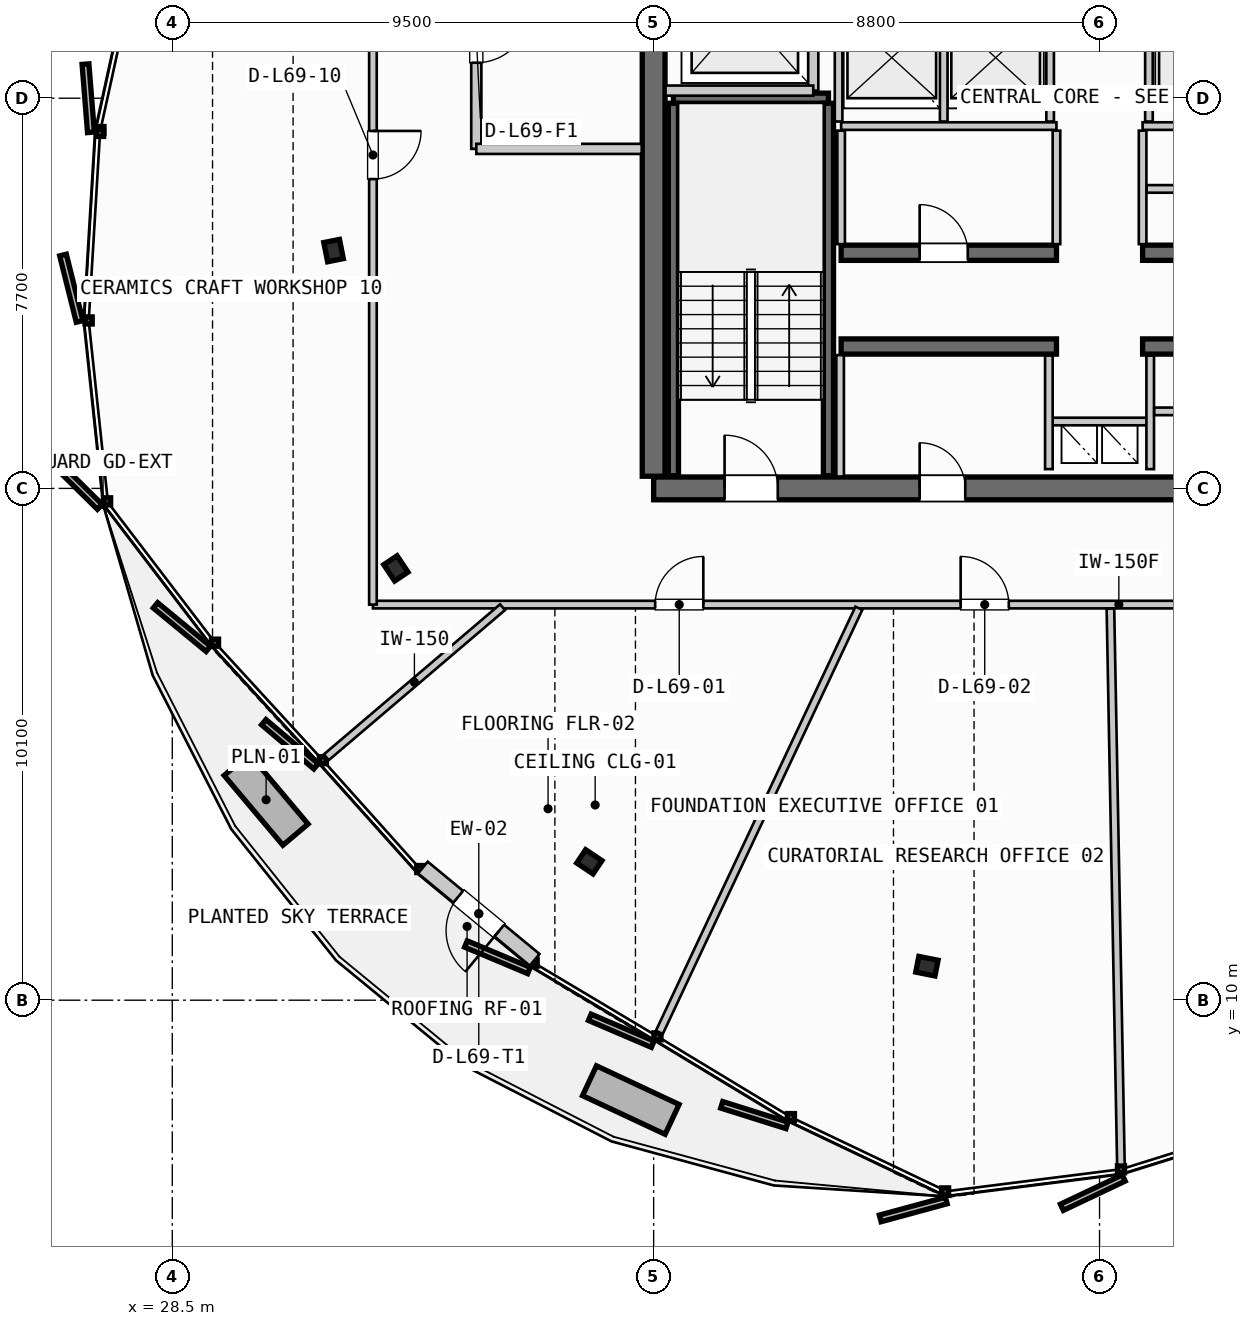
"""IFC4 building model, lengths in metres.
Left out: names, types, materials, properties, quantities, classifications, styles, units other than length and angle.
Written with IfcOpenShell. Run it as: python <this file> out.ifc"""

import sys

from ifc_helpers import new_model, si_unit, direction, frame, frame_2d, origin, origin_2d, place, context, subcontext, project, spatial, rectangle, i_section, extrude, source, transform, mapped, element, fill, save


model = new_model("IFC4")
c1 = context("Model", 3, precision=1e-05, world=origin(), true_north=direction((0.0, 1.0)))
c2 = subcontext(c1, "Body", "Model", "MODEL_VIEW")
j1 = project(units=[si_unit("LENGTHUNIT", "METRE"), si_unit("PLANEANGLEUNIT", "RADIAN")], contexts=[c1])
p1 = place(None, origin())
s1 = spatial("IfcSite", under=j1, at=p1, CompositionType="ELEMENT")
p2 = place(p1, origin())
s2 = spatial("IfcBuilding", under=s1, at=p2, CompositionType="ELEMENT")
p3 = place(p2, frame((0.0, 0.0, 262.9)))
s3 = spatial("IfcBuildingStorey", under=s2, at=p3, CompositionType="ELEMENT", Elevation=262.9)
p4 = place(p3, frame((38.0, 20.1, 0.0), z_axis=(0.0, 0.0, 1.0), x_axis=(1.0, 0.0, 0.0)))
e1 = element("IfcWall", 1, at=p4, inside=s3, PredefinedType="SHEAR", context=c2, shape_type="SweptSolid", body=[
    extrude(rectangle(XDim=17.6, YDim=0.45, at=frame_2d((8.8, 0.0))), origin(), (0.0, 0.0, 1.0), 3.21),
])
p5 = place(p4, frame((1.4, 0.0, 0.0)))
e2 = element("IfcOpeningElement", 2, at=p5, cuts=e1, PredefinedType="OPENING", context=c2, shape_type="SweptSolid", body=[
    extrude(rectangle(XDim=1.05, YDim=2.15, at=frame_2d((0.525, 1.075))), frame((0.0, 0.235, 0.0), z_axis=(0.0, -1.0, 0.0), x_axis=(1.0, 0.0, 0.0)), (0.0, 0.0, 1.0), 0.47),
])
p6 = place(p4, frame((15.15, 0.0, 0.0)))
e3 = element("IfcOpeningElement", 3, at=p6, cuts=e1, PredefinedType="OPENING", context=c2, shape_type="SweptSolid", body=[
    extrude(rectangle(XDim=1.05, YDim=2.15, at=frame_2d((0.525, 1.075))), frame((0.0, 0.235, 0.0), z_axis=(0.0, -1.0, 0.0), x_axis=(1.0, 0.0, 0.0)), (0.0, 0.0, 1.0), 0.47),
])
p7 = place(p4, frame((5.25, 0.0, 0.0)))
e4 = element("IfcOpeningElement", 4, at=p7, cuts=e1, PredefinedType="OPENING", context=c2, shape_type="SweptSolid", body=[
    extrude(rectangle(XDim=0.9, YDim=2.15, at=frame_2d((0.45, 1.075))), frame((0.0, 0.235, 0.0), z_axis=(0.0, -1.0, 0.0), x_axis=(1.0, 0.0, 0.0)), (0.0, 0.0, 1.0), 0.47),
])
p8 = place(p4, frame((11.4, 0.0, 0.0)))
e5 = element("IfcOpeningElement", 5, at=p8, cuts=e1, PredefinedType="OPENING", context=c2, shape_type="SweptSolid", body=[
    extrude(rectangle(XDim=0.95, YDim=2.15, at=frame_2d((0.475, 1.075))), frame((0.0, 0.235, 0.0), z_axis=(0.0, -1.0, 0.0), x_axis=(1.0, 0.0, 0.0)), (0.0, 0.0, 1.0), 0.47),
])
p9 = place(p3, frame((38.0, 35.26, 0.0), z_axis=(0.0, 0.0, 1.0), x_axis=(0.0, -1.0, 0.0)))
e6 = element("IfcWall", 6, at=p9, inside=s3, PredefinedType="SHEAR", context=c2, shape_type="SweptSolid", body=[
    extrude(rectangle(XDim=14.92, YDim=0.45, at=frame_2d((7.46, 0.0))), origin(), (0.0, 0.0, 1.0), 3.21),
])
p10 = place(p9, frame((5.21, 0.0, 0.0)))
e7 = element("IfcOpeningElement", 7, at=p10, cuts=e6, PredefinedType="OPENING", context=c2, shape_type="SweptSolid", body=[
    extrude(rectangle(XDim=1.1, YDim=2.2, at=frame_2d((0.55, 1.1))), frame((0.0, 0.235, 0.0), z_axis=(0.0, -1.0, 0.0), x_axis=(1.0, 0.0, 0.0)), (0.0, 0.0, 1.0), 0.47),
])
for number, where, z_axis, x_axis in (
    (8, (41.7, 22.9, 0.0), (0.0, 0.0, 1.0), (1.0, 0.0, 0.0)),
    (9, (47.65, 22.9, 0.0), (0.0, 0.0, 1.0), (1.0, 0.0, 0.0)),
):
    element("IfcWall", number, at=place(p3, frame(where, z_axis=z_axis, x_axis=x_axis)), inside=s3, PredefinedType="SHEAR", context=c2, shape_type="SweptSolid", body=[
        extrude(rectangle(XDim=4.25, YDim=0.3, at=frame_2d((2.125, 0.0))), origin(), (0.0, 0.0, 1.0), 3.21),
    ])
p11 = place(p3, frame((41.7, 24.75, 0.0), z_axis=(0.0, 0.0, 1.0), x_axis=(1.0, 0.0, 0.0)))
e10 = element("IfcWall", 10, at=p11, inside=s3, PredefinedType="SHEAR", context=c2, shape_type="SweptSolid", body=[
    extrude(rectangle(XDim=4.25, YDim=0.3, at=frame_2d((2.125, 0.0))), origin(), (0.0, 0.0, 1.0), 3.21),
])
p12 = place(p11, frame((1.55, 0.0, 0.0)))
e11 = element("IfcOpeningElement", 11, at=p12, cuts=e10, PredefinedType="OPENING", context=c2, shape_type="SweptSolid", body=[
    extrude(rectangle(XDim=0.95, YDim=2.15, at=frame_2d((0.475, 1.075))), frame((0.0, 0.16, 0.0), z_axis=(0.0, -1.0, 0.0), x_axis=(1.0, 0.0, 0.0)), (0.0, 0.0, 1.0), 0.32),
])
p13 = place(p3, frame((47.65, 24.75, 0.0), z_axis=(0.0, 0.0, 1.0), x_axis=(1.0, 0.0, 0.0)))
e12 = element("IfcWall", 12, at=p13, inside=s3, PredefinedType="SHEAR", context=c2, shape_type="SweptSolid", body=[
    extrude(rectangle(XDim=4.25, YDim=0.3, at=frame_2d((2.125, 0.0))), origin(), (0.0, 0.0, 1.0), 3.21),
])
p14 = place(p13, frame((1.55, 0.0, 0.0)))
e13 = element("IfcOpeningElement", 13, at=p14, cuts=e12, PredefinedType="OPENING", context=c2, shape_type="SweptSolid", body=[
    extrude(rectangle(XDim=0.95, YDim=2.15, at=frame_2d((0.475, 1.075))), frame((0.0, 0.16, 0.0), z_axis=(0.0, -1.0, 0.0), x_axis=(1.0, 0.0, 0.0)), (0.0, 0.0, 1.0), 0.32),
])
m1 = source(origin(), c2, "Body", "SweptSolid", [
    extrude(i_section(OverallWidth=0.387, OverallDepth=0.316, WebThickness=0.019, FlangeThickness=0.028, FilletRadius=0.015, at=origin_2d()), origin(), (0.0, 0.0, 1.0), 3.21),
])
for number, where, z_axis, x_axis in (
    (14, (31.683, 24.793, 0.0), (0.0, 0.0, 1.0), (-0.981, -0.195, 0.0)),
    (15, (32.913, 18.521, 0.0), (0.0, 0.0, 1.0), (-0.831, -0.556, 0.0)),
    (16, (36.731, 12.731, 0.0), (0.0, 0.0, 1.0), (-0.556, -0.831, 0.0)),
    (17, (43.393, 10.671, 0.0), (0.0, 0.0, 1.0), (-0.195, -0.981, 0.0)),
):
    element("IfcColumn", number, at=place(p3, frame(where, z_axis=z_axis, x_axis=x_axis)), inside=s3, PredefinedType="COLUMN", context=c2, shape_type="MappedRepresentation", body=[
        mapped(m1, transform((0.0, 0.0, 0.0), scale=1.0)),
    ])
p15 = place(p3, frame((35.652, 10.797, 0.0), z_axis=(0.0, 0.0, 1.0), x_axis=(-0.771081999768, 0.636735855465, 0.0)))
e18 = element("IfcWall", 18, at=p15, inside=s3, PredefinedType="SOLIDWALL", context=c2, shape_type="SweptSolid", body=[
    extrude(rectangle(XDim=2.86, YDim=0.3, at=frame_2d((1.43, 0.0))), origin(), (0.0, 0.0, 1.0), 2.735),
])
p16 = place(p15, frame((0.905, 0.0, 0.0)))
e19 = element("IfcOpeningElement", 19, at=p16, cuts=e18, PredefinedType="OPENING", context=c2, shape_type="SweptSolid", body=[
    extrude(rectangle(XDim=1.05, YDim=2.2, at=frame_2d((0.525, 1.1))), frame((0.0, 0.16, 0.0), z_axis=(0.0, -1.0, 0.0), x_axis=(1.0, 0.0, 0.0)), (0.0, 0.0, 1.0), 0.32),
])
p17 = place(p3, frame((38.39, 27.8, 0.0), z_axis=(0.0, 0.0, 1.0), x_axis=(1.0, 0.0, 0.0)))
e20 = element("IfcWall", 20, at=p17, inside=s3, PredefinedType="SHEAR", context=c2, shape_type="SweptSolid", body=[
    extrude(rectangle(XDim=3.06, YDim=0.2, at=frame_2d((1.53, 0.0))), origin(), (0.0, 0.0, 1.0), 3.21),
])
for number, where, z_axis, x_axis in (
    (21, (41.45, 27.7, 0.0), (0.0, 0.0, 1.0), (0.0, -1.0, 0.0)),
    (22, (38.39, 20.35, 0.0), (0.0, 0.0, 1.0), (0.0, 1.0, 0.0)),
):
    element("IfcWall", number, at=place(p3, frame(where, z_axis=z_axis, x_axis=x_axis)), inside=s3, PredefinedType="SHEAR", context=c2, shape_type="SweptSolid", body=[
        extrude(rectangle(XDim=7.35, YDim=0.2, at=frame_2d((3.675, 0.0))), origin(), (0.0, 0.0, 1.0), 3.21),
    ])
p18 = place(p3, frame((45.8, 21.42, 0.0), z_axis=(0.0, 0.0, 1.0), x_axis=(1.0, 0.0, 0.0)))
e23 = element("IfcWall", 23, at=p18, inside=s3, PredefinedType="PARTITIONING", context=c2, shape_type="SweptSolid", body=[
    extrude(rectangle(XDim=2.0, YDim=0.15, at=frame_2d((1.0, 0.0))), origin(), (0.0, 0.0, 1.0), 2.735),
])
for number, where, z_axis, x_axis in (
    (24, (45.8, 20.48, 0.0), (0.0, 0.0, 1.0), (0.0, 1.0, 0.0)),
    (25, (47.8, 20.48, 0.0), (0.0, 0.0, 1.0), (0.0, 1.0, 0.0)),
):
    element("IfcWall", number, at=place(p3, frame(where, z_axis=z_axis, x_axis=x_axis)), inside=s3, PredefinedType="PARTITIONING", context=c2, shape_type="SweptSolid", body=[
        extrude(rectangle(XDim=2.24, YDim=0.15, at=frame_2d((1.12, 0.0))), origin(), (0.0, 0.0, 1.0), 2.735),
    ])
p19 = place(p3, frame((41.15, 27.95, 0.0), z_axis=(0.0, 0.0, 1.0), x_axis=(0.0, 1.0, 0.0)))
e26 = element("IfcWall", 26, at=p19, inside=s3, PredefinedType="PARTITIONING", context=c2, shape_type="SweptSolid", body=[
    extrude(rectangle(XDim=3.1, YDim=0.2, at=frame_2d((1.55, 0.0))), origin(), (0.0, 0.0, 1.0), 2.735),
])
p20 = place(p3, frame((38.235, 27.95, 0.0), z_axis=(0.0, 0.0, 1.0), x_axis=(1.0, 0.0, 0.0)))
e27 = element("IfcWall", 27, at=p20, inside=s3, PredefinedType="PARTITIONING", context=c2, shape_type="SweptSolid", body=[
    extrude(rectangle(XDim=2.915, YDim=0.2, at=frame_2d((1.458, 0.0))), origin(), (0.0, 0.0, 1.0), 2.735),
])
p21 = place(p3, frame((34.5, 31.2, 0.0), z_axis=(0.0, 0.0, 1.0), x_axis=(0.0, -1.0, 0.0)))
e28 = element("IfcWall", 28, at=p21, inside=s3, PredefinedType="PARTITIONING", context=c2, shape_type="SweptSolid", body=[
    extrude(rectangle(XDim=4.4, YDim=0.2, at=frame_2d((2.2, 0.0))), origin(), (0.0, 0.0, 1.0), 2.735),
])
p22 = place(p21, frame((1.65, 0.0, 0.0)))
e29 = element("IfcOpeningElement", 29, at=p22, cuts=e28, PredefinedType="OPENING", context=c2, shape_type="SweptSolid", body=[
    extrude(rectangle(XDim=1.05, YDim=2.15, at=frame_2d((0.525, 1.075))), frame((0.0, 0.11, 0.0), z_axis=(0.0, -1.0, 0.0), x_axis=(1.0, 0.0, 0.0)), (0.0, 0.0, 1.0), 0.22),
])
p23 = place(p3, frame((34.5, 26.8, 0.0), z_axis=(0.0, 0.0, 1.0), x_axis=(1.0, 0.0, 0.0)))
e30 = element("IfcWall", 30, at=p23, inside=s3, PredefinedType="PARTITIONING", context=c2, shape_type="SweptSolid", body=[
    extrude(rectangle(XDim=3.265, YDim=0.2, at=frame_2d((1.632, 0.0))), origin(), (0.0, 0.0, 1.0), 2.735),
])
p24 = place(p3, frame((41.68, 20.335, 0.0), z_axis=(0.0, 0.0, 1.0), x_axis=(0.0, 1.0, 0.0)))
e31 = element("IfcWall", 31, at=p24, inside=s3, PredefinedType="PARTITIONING", context=c2, shape_type="SweptSolid", body=[
    extrude(rectangle(XDim=2.395, YDim=0.15, at=frame_2d((1.198, 0.0))), origin(), (0.0, 0.0, 1.0), 2.735),
])
p25 = place(p3, frame((47.88, 21.62, 0.0), z_axis=(0.0, 0.0, 1.0), x_axis=(1.0, 0.0, 0.0)))
e32 = element("IfcWall", 32, at=p25, inside=s3, PredefinedType="PARTITIONING", context=c2, shape_type="SweptSolid", body=[
    extrude(rectangle(XDim=3.96, YDim=0.15, at=frame_2d((1.98, 0.0))), origin(), (0.0, 0.0, 1.0), 2.735),
])
p26 = place(p25, frame((1.55, 0.0, 0.0)))
e33 = element("IfcOpeningElement", 33, at=p26, cuts=e32, PredefinedType="OPENING", context=c2, shape_type="SweptSolid", body=[
    extrude(rectangle(XDim=0.85, YDim=2.15, at=frame_2d((0.425, 1.075))), frame((0.0, 0.085, 0.0), z_axis=(0.0, -1.0, 0.0), x_axis=(1.0, 0.0, 0.0)), (0.0, 0.0, 1.0), 0.17),
])
for number, where, z_axis, x_axis in (
    (34, (41.7, 27.25, 0.0), (0.0, 0.0, 1.0), (1.0, 0.0, 0.0)),
    (35, (47.65, 27.25, 0.0), (0.0, 0.0, 1.0), (1.0, 0.0, 0.0)),
):
    element("IfcWall", number, at=place(p3, frame(where, z_axis=z_axis, x_axis=x_axis)), inside=s3, PredefinedType="PARTITIONING", context=c2, shape_type="SweptSolid", body=[
        extrude(rectangle(XDim=4.25, YDim=0.15, at=frame_2d((2.125, 0.0))), origin(), (0.0, 0.0, 1.0), 2.735),
    ])
for number, where, z_axis, x_axis in (
    (36, (41.7, 24.92, 0.0), (0.0, 0.0, 1.0), (0.0, 1.0, 0.0)),
    (37, (45.95, 24.92, 0.0), (0.0, 0.0, 1.0), (0.0, 1.0, 0.0)),
    (38, (47.65, 24.92, 0.0), (0.0, 0.0, 1.0), (0.0, 1.0, 0.0)),
):
    element("IfcWall", number, at=place(p3, frame(where, z_axis=z_axis, x_axis=x_axis)), inside=s3, PredefinedType="PARTITIONING", context=c2, shape_type="SweptSolid", body=[
        extrude(rectangle(XDim=2.24, YDim=0.15, at=frame_2d((1.12, 0.0))), origin(), (0.0, 0.0, 1.0), 2.735),
    ])
p27 = place(p3, frame((47.73, 26.01, 0.0), z_axis=(0.0, 0.0, 1.0), x_axis=(1.0, 0.0, 0.0)))
e39 = element("IfcWall", 39, at=p27, inside=s3, PredefinedType="PARTITIONING", context=c2, shape_type="SweptSolid", body=[
    extrude(rectangle(XDim=4.09, YDim=0.15, at=frame_2d((2.045, 0.0))), origin(), (0.0, 0.0, 1.0), 2.735),
])
p28 = place(p27, frame((1.6, 0.0, 0.0)))
e40 = element("IfcOpeningElement", 40, at=p28, cuts=e39, PredefinedType="OPENING", context=c2, shape_type="SweptSolid", body=[
    extrude(rectangle(XDim=0.85, YDim=2.15, at=frame_2d((0.425, 1.075))), frame((0.0, 0.085, 0.0), z_axis=(0.0, -1.0, 0.0), x_axis=(1.0, 0.0, 0.0)), (0.0, 0.0, 1.0), 0.17),
])
for number, where, z_axis, x_axis in (
    (41, (41.65, 27.34, 0.0), (0.0, 0.0, 1.0), (0.0, 1.0, 0.0)),
    (42, (43.725, 27.34, 0.0), (0.0, 0.0, 1.0), (0.0, 1.0, 0.0)),
    (43, (45.825, 27.34, 0.0), (0.0, 0.0, 1.0), (0.0, 1.0, 0.0)),
    (44, (47.775, 27.34, 0.0), (0.0, 0.0, 1.0), (0.0, 1.0, 0.0)),
):
    element("IfcWall", number, at=place(p3, frame(where, z_axis=z_axis, x_axis=x_axis)), inside=s3, PredefinedType="PARTITIONING", context=c2, shape_type="SweptSolid", body=[
        extrude(rectangle(XDim=2.34, YDim=0.15, at=frame_2d((1.17, 0.0))), origin(), (0.0, 0.0, 1.0), 2.735),
    ])
p29 = place(p3, frame((32.46, 17.807, 0.0), z_axis=(0.0, 0.0, 1.0), x_axis=(1.0, 0.0, 0.0)))
e45 = element("IfcWall", 45, at=p29, inside=s3, PredefinedType="PARTITIONING", context=c2, shape_type="SweptSolid", body=[
    extrude(rectangle(XDim=29.442, YDim=0.15, at=frame_2d((14.721, 0.0))), origin(), (0.0, 0.0, 1.0), 2.735),
])
p30 = place(p29, frame((5.57, 0.0, 0.0)))
e46 = element("IfcOpeningElement", 46, at=p30, cuts=e45, PredefinedType="OPENING", context=c2, shape_type="SweptSolid", body=[
    extrude(rectangle(XDim=0.95, YDim=2.15, at=frame_2d((0.475, 1.075))), frame((0.0, 0.085, 0.0), z_axis=(0.0, -1.0, 0.0), x_axis=(1.0, 0.0, 0.0)), (0.0, 0.0, 1.0), 0.17),
])
p31 = place(p29, frame((11.599, 0.0, 0.0)))
e47 = element("IfcOpeningElement", 47, at=p31, cuts=e45, PredefinedType="OPENING", context=c2, shape_type="SweptSolid", body=[
    extrude(rectangle(XDim=0.95, YDim=2.15, at=frame_2d((0.475, 1.075))), frame((0.0, 0.085, 0.0), z_axis=(0.0, -1.0, 0.0), x_axis=(1.0, 0.0, 0.0)), (0.0, 0.0, 1.0), 0.17),
])
p32 = place(p29, frame((18.949, 0.0, 0.0)))
e48 = element("IfcOpeningElement", 48, at=p32, cuts=e45, PredefinedType="OPENING", context=c2, shape_type="SweptSolid", body=[
    extrude(rectangle(XDim=0.95, YDim=2.15, at=frame_2d((0.475, 1.075))), frame((0.0, 0.085, 0.0), z_axis=(0.0, -1.0, 0.0), x_axis=(1.0, 0.0, 0.0)), (0.0, 0.0, 1.0), 0.17),
])
p33 = place(p29, frame((26.046, 0.0, 0.0)))
e49 = element("IfcOpeningElement", 49, at=p33, cuts=e45, PredefinedType="OPENING", context=c2, shape_type="SweptSolid", body=[
    extrude(rectangle(XDim=0.95, YDim=2.15, at=frame_2d((0.475, 1.075))), frame((0.0, 0.085, 0.0), z_axis=(0.0, -1.0, 0.0), x_axis=(1.0, 0.0, 0.0)), (0.0, 0.0, 1.0), 0.17),
])
p34 = place(p3, frame((32.46, 37.331, 0.0), z_axis=(0.0, 0.0, 1.0), x_axis=(0.0, -1.0, 0.0)))
e50 = element("IfcWall", 50, at=p34, inside=s3, PredefinedType="PARTITIONING", context=c2, shape_type="SweptSolid", body=[
    extrude(rectangle(XDim=19.524, YDim=0.15, at=frame_2d((9.762, 0.0))), origin(), (0.0, 0.0, 1.0), 2.735),
])
p35 = place(p34, frame((10.177, 0.0, 0.0)))
e51 = element("IfcOpeningElement", 51, at=p35, cuts=e50, PredefinedType="OPENING", context=c2, shape_type="SweptSolid", body=[
    extrude(rectangle(XDim=0.95, YDim=2.15, at=frame_2d((0.475, 1.075))), frame((0.0, 0.085, 0.0), z_axis=(0.0, -1.0, 0.0), x_axis=(1.0, 0.0, 0.0)), (0.0, 0.0, 1.0), 0.17),
])
p36 = place(p3, frame((35.017, 17.755, 0.0), z_axis=(0.0, 0.0, 1.0), x_axis=(-0.761320429179, -0.648375820118, 0.0)))
e52 = element("IfcWall", 52, at=p36, inside=s3, PredefinedType="PARTITIONING", context=c2, shape_type="SweptSolid", body=[
    extrude(rectangle(XDim=4.567, YDim=0.15, at=frame_2d((2.284, 0.0))), origin(), (0.0, 0.0, 1.0), 2.735),
])
p37 = place(p3, frame((42.05, 17.735, 0.0), z_axis=(0.0, 0.0, 1.0), x_axis=(-0.42575507984, -0.904838445243, 0.0)))
e53 = element("IfcWall", 53, at=p37, inside=s3, PredefinedType="PARTITIONING", context=c2, shape_type="SweptSolid", body=[
    extrude(rectangle(XDim=9.248, YDim=0.15, at=frame_2d((4.624, 0.0))), origin(), (0.0, 0.0, 1.0), 2.735),
])
p38 = place(p3, frame((47.015, 17.727, 0.0), z_axis=(0.0, 0.0, 1.0), x_axis=(0.018840233675, -0.999822507046, 0.0)))
e54 = element("IfcWall", 54, at=p38, inside=s3, PredefinedType="PARTITIONING", context=c2, shape_type="SweptSolid", body=[
    extrude(rectangle(XDim=10.976, YDim=0.15, at=frame_2d((5.488, 0.0))), origin(), (0.0, 0.0, 1.0), 2.735),
])
m2 = source(origin(), c2, "Body", "SweptSolid", [
    extrude(rectangle(XDim=1.05, YDim=2.2, at=frame_2d((0.525, 1.1))), frame((0.0, 0.025, 0.0), z_axis=(0.0, -1.0, 0.0), x_axis=(1.0, 0.0, 0.0)), (0.0, 0.0, 1.0), 0.05),
])
p39 = place(p16, origin())
e55 = element("IfcDoor", 55, at=p39, inside=s3, OperationType="SINGLE_SWING_LEFT", PredefinedType="DOOR", context=c2, shape_type="MappedRepresentation", body=[
    mapped(m2, transform((0.0, 0.0, 0.0), scale=1.0)),
])
fill(e19, e55)
m3 = source(origin(), c2, "Body", "SweptSolid", [
    extrude(rectangle(XDim=1.05, YDim=2.15, at=frame_2d((0.525, 1.075))), frame((0.0, 0.025, 0.0), z_axis=(0.0, -1.0, 0.0), x_axis=(1.0, 0.0, 0.0)), (0.0, 0.0, 1.0), 0.05),
])
p40 = place(p5, origin())
e56 = element("IfcDoor", 56, at=p40, inside=s3, OperationType="SINGLE_SWING_LEFT", PredefinedType="DOOR", context=c2, shape_type="MappedRepresentation", body=[
    mapped(m3, transform((0.0, 0.0, 0.0), scale=1.0)),
])
fill(e2, e56)
m4 = source(origin(), c2, "Body", "SweptSolid", [
    extrude(rectangle(XDim=0.9, YDim=2.15, at=frame_2d((0.45, 1.075))), frame((0.0, 0.025, 0.0), z_axis=(0.0, -1.0, 0.0), x_axis=(1.0, 0.0, 0.0)), (0.0, 0.0, 1.0), 0.05),
])
p41 = place(p7, origin())
e57 = element("IfcDoor", 57, at=p41, inside=s3, OperationType="SINGLE_SWING_LEFT", PredefinedType="DOOR", context=c2, shape_type="MappedRepresentation", body=[
    mapped(m4, transform((0.0, 0.0, 0.0), scale=1.0)),
])
fill(e4, e57)
m5 = source(origin(), c2, "Body", "SweptSolid", [
    extrude(rectangle(XDim=0.95, YDim=2.15, at=frame_2d((0.475, 1.075))), frame((0.0, 0.025, 0.0), z_axis=(0.0, -1.0, 0.0), x_axis=(1.0, 0.0, 0.0)), (0.0, 0.0, 1.0), 0.05),
])
p42 = place(p12, origin())
e58 = element("IfcDoor", 58, at=p42, inside=s3, OperationType="SINGLE_SWING_LEFT", PredefinedType="DOOR", context=c2, shape_type="MappedRepresentation", body=[
    mapped(m5, transform((0.0, 0.0, 0.0), scale=1.0)),
])
fill(e11, e58)
p43 = place(p22, origin())
e59 = element("IfcDoor", 59, at=p43, inside=s3, OperationType="SINGLE_SWING_LEFT", PredefinedType="DOOR", context=c2, shape_type="MappedRepresentation", body=[
    mapped(m3, transform((0.0, 0.0, 0.0), scale=1.0)),
])
fill(e29, e59)
p44 = place(p30, origin())
e60 = element("IfcDoor", 60, at=p44, inside=s3, OperationType="SINGLE_SWING_RIGHT", PredefinedType="DOOR", context=c2, shape_type="MappedRepresentation", body=[
    mapped(m5, transform((0.0, 0.0, 0.0), scale=1.0)),
])
fill(e46, e60)
p45 = place(p31, origin())
e61 = element("IfcDoor", 61, at=p45, inside=s3, OperationType="SINGLE_SWING_LEFT", PredefinedType="DOOR", context=c2, shape_type="MappedRepresentation", body=[
    mapped(m5, transform((0.0, 0.0, 0.0), scale=1.0)),
])
fill(e47, e61)
p46 = place(p35, origin())
e62 = element("IfcDoor", 62, at=p46, inside=s3, OperationType="SINGLE_SWING_LEFT", PredefinedType="DOOR", context=c2, shape_type="MappedRepresentation", body=[
    mapped(m5, transform((0.0, 0.0, 0.0), scale=1.0)),
])
fill(e51, e62)
save(model, sys.argv[1])
